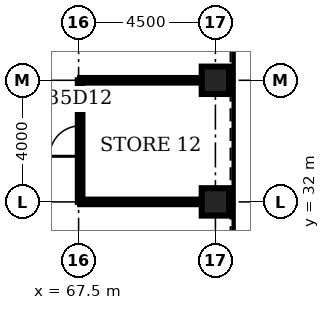
"""IFC4 building model, lengths in metres.
Left out: names, types, materials, properties, quantities, classifications, styles, units other than length and angle.
Written with IfcOpenShell. Run it as: python <this file> out.ifc"""

import sys

from ifc_helpers import new_model, si_unit, direction, frame, frame_2d, origin, origin_2d, place, context, subcontext, project, spatial, rectangle, hollow_rectangle, extrude, element, fill, save


model = new_model("IFC4")
c1 = context("Model", 3, precision=1e-05, world=origin(), true_north=direction((0.0, 1.0)))
c2 = subcontext(c1, "Body", "Model", "MODEL_VIEW")
j1 = project(units=[si_unit("LENGTHUNIT", "METRE"), si_unit("PLANEANGLEUNIT", "RADIAN")], contexts=[c1])
p1 = place(None, origin())
s1 = spatial("IfcSite", under=j1, at=p1, CompositionType="ELEMENT")
p2 = place(p1, origin())
s2 = spatial("IfcBuilding", under=s1, at=p2, CompositionType="ELEMENT")
p3 = place(p2, frame((0.0, 0.0, 159.3)))
s3 = spatial("IfcBuildingStorey", under=s2, at=p3, CompositionType="ELEMENT", Elevation=159.3)
for number, where, z_axis, x_axis in (
    (1, (72.0, 32.0, 0.0), (0.0, 0.0, 1.0), (1.0, 0.0, 0.0)),
    (2, (72.0, 36.0, 0.0), (0.0, 0.0, 1.0), (1.0, 0.0, 0.0)),
):
    element("IfcColumn", number, at=place(p3, frame(where, z_axis=z_axis, x_axis=x_axis)), inside=s3, PredefinedType="COLUMN", context=c2, shape_type="SweptSolid", body=[
        extrude(hollow_rectangle(XDim=0.9, YDim=0.9, WallThickness=0.1, at=origin_2d()), origin(), (0.0, 0.0, 1.0), 4.2),
    ])
for number, where, z_axis, x_axis in (
    (3, (67.55, 32.0, 0.0), (0.0, 0.0, 1.0), (1.0, 0.0, 0.0)),
    (4, (67.55, 36.0, 0.0), (0.0, 0.0, 1.0), (1.0, 0.0, 0.0)),
):
    element("IfcWall", number, at=place(p3, frame(where, z_axis=z_axis, x_axis=x_axis)), inside=s3, PredefinedType="PARTITIONING", context=c2, shape_type="SweptSolid", body=[
        extrude(rectangle(XDim=4.0, YDim=0.15, at=frame_2d((2.0, 0.0))), origin(), (0.0, 0.0, 1.0), 3.0),
    ])
p4 = place(p3, frame((67.55, 32.0, 0.0), z_axis=(0.0, 0.0, 1.0), x_axis=(0.0, 1.0, 0.0)))
e5 = element("IfcWall", 5, at=p4, inside=s3, PredefinedType="PARTITIONING", context=c2, shape_type="SweptSolid", body=[
    extrude(rectangle(XDim=4.0, YDim=0.15, at=frame_2d((2.0, 0.0))), origin(), (0.0, 0.0, 1.0), 3.0),
])
p5 = place(p4, frame((1.5, 0.0, 0.0)))
e6 = element("IfcOpeningElement", 6, at=p5, cuts=e5, PredefinedType="OPENING", context=c2, shape_type="SweptSolid", body=[
    extrude(rectangle(XDim=1.0, YDim=2.1, at=frame_2d((0.5, 1.05))), frame((0.0, 0.085, 0.0), z_axis=(0.0, -1.0, 0.0), x_axis=(1.0, 0.0, 0.0)), (0.0, 0.0, 1.0), 0.17),
])
p6 = place(p5, origin())
e7 = element("IfcDoor", 7, at=p6, inside=s3, OperationType="SINGLE_SWING_LEFT", PredefinedType="DOOR", context=c2, shape_type="SweptSolid", body=[
    extrude(rectangle(XDim=1.0, YDim=2.1, at=frame_2d((0.5, 1.05))), frame((0.0, 0.025, 0.0), z_axis=(0.0, -1.0, 0.0), x_axis=(1.0, 0.0, 0.0)), (0.0, 0.0, 1.0), 0.05),
])
fill(e6, e7)
save(model, sys.argv[1])
